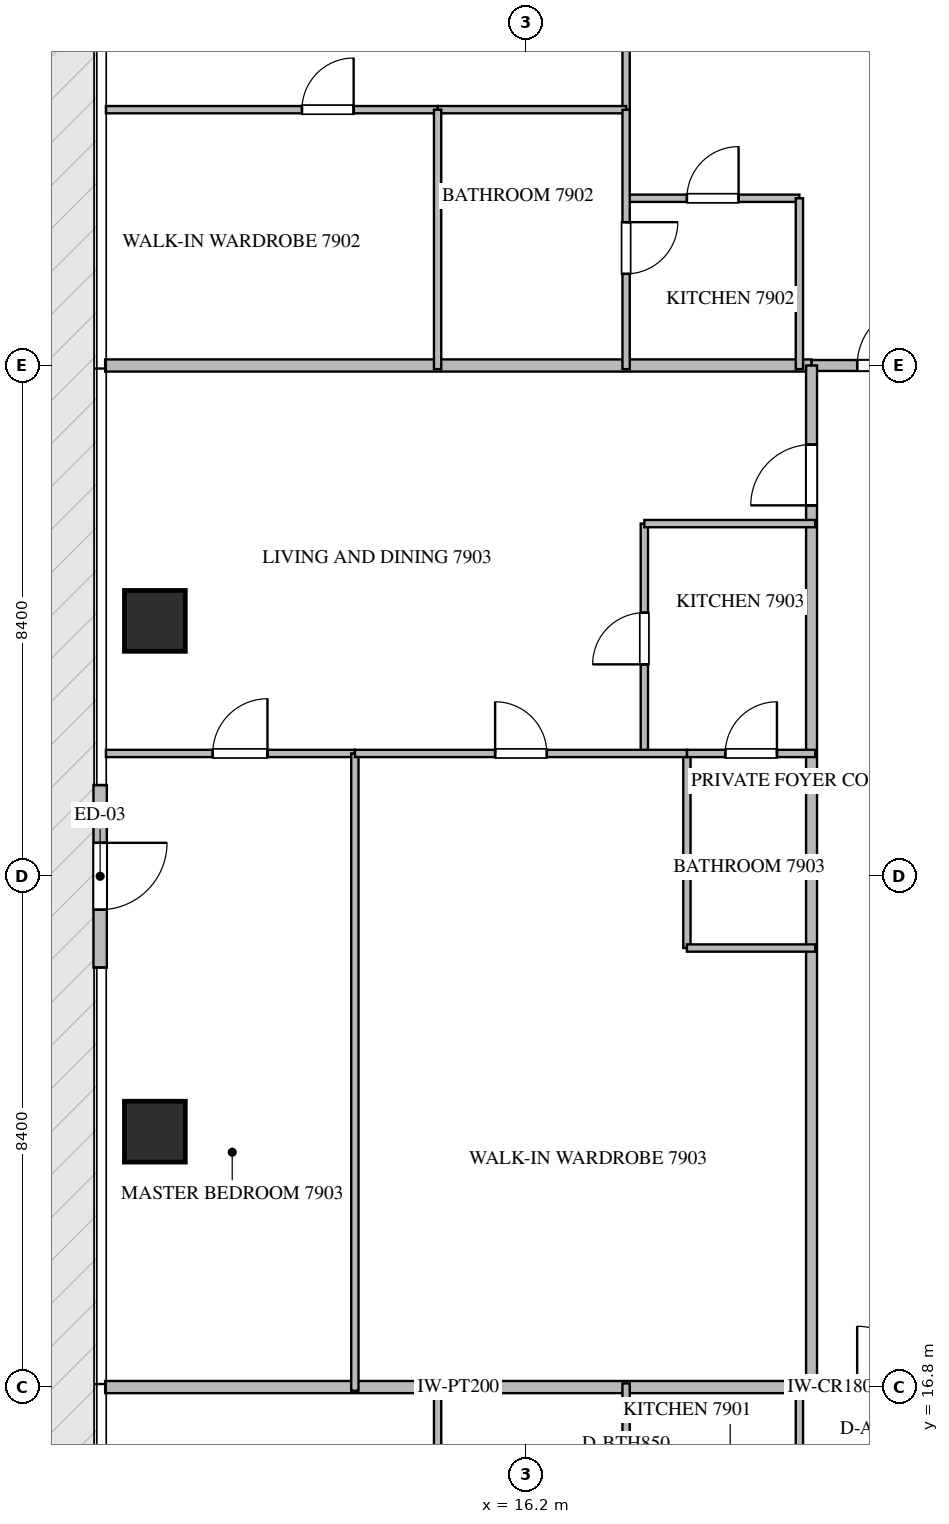
"""IFC4 building model, lengths in metres.
Left out: names, types, materials, properties, quantities, classifications, styles, units other than length and angle.
Written with IfcOpenShell. Run it as: python <this file> out.ifc"""

import sys

from ifc_helpers import new_model, si_unit, direction, frame, frame_2d, origin, origin_2d, place, context, subcontext, project, spatial, rectangle, extrude, source, transform, mapped, element, fill, save


model = new_model("IFC4")
c1 = context("Model", 3, precision=1e-05, world=origin(), true_north=direction((0.0, 1.0)))
c2 = subcontext(c1, "Body", "Model", "MODEL_VIEW")
j1 = project(units=[si_unit("LENGTHUNIT", "METRE"), si_unit("PLANEANGLEUNIT", "RADIAN")], contexts=[c1])
p1 = place(None, origin())
s1 = spatial("IfcSite", under=j1, at=p1, CompositionType="ELEMENT")
p2 = place(p1, origin())
s2 = spatial("IfcBuilding", under=s1, at=p2, CompositionType="ELEMENT")
p3 = place(p2, frame((0.0, 0.0, 317.75)))
s3 = spatial("IfcBuildingStorey", under=s2, at=p3, CompositionType="ELEMENT", Elevation=317.75)
m1 = source(origin(), c2, "Body", "SweptSolid", [
    extrude(rectangle(XDim=1.0, YDim=1.0, at=origin_2d()), origin(), (0.0, 0.0, 1.0), 4.05),
])
for number, where, z_axis, x_axis in (
    (1, (10.1, 21.0, -0.26), (0.0, 0.0, 1.0), (1.0, 0.0, 0.0)),
    (2, (10.1, 29.4, -0.26), (0.0, 0.0, 1.0), (1.0, 0.0, 0.0)),
):
    element("IfcColumn", number, at=place(p3, frame(where, z_axis=z_axis, x_axis=x_axis)), inside=s3, PredefinedType="COLUMN", context=c2, shape_type="MappedRepresentation", body=[
        mapped(m1, transform((0.0, 0.0, 0.0), scale=1.0)),
    ])
p4 = place(p3, frame((9.2, 26.7, 0.0), z_axis=(0.0, 0.0, 1.0), x_axis=(0.0, -1.0, 0.0)))
e3 = element("IfcWall", 3, at=p4, inside=s3, PredefinedType="ELEMENTEDWALL", context=c2, shape_type="SweptSolid", body=[
    extrude(rectangle(XDim=3.0, YDim=0.22, at=frame_2d((1.5, 0.0))), origin(), (0.0, 0.0, 1.0), 3.775),
])
p5 = place(p4, frame((0.95, 0.0, 0.0)))
e4 = element("IfcOpeningElement", 4, at=p5, cuts=e3, PredefinedType="OPENING", context=c2, shape_type="SweptSolid", body=[
    extrude(rectangle(XDim=1.1, YDim=2.2, at=frame_2d((0.55, 1.1))), frame((0.0, 0.12, 0.0), z_axis=(0.0, -1.0, 0.0), x_axis=(1.0, 0.0, 0.0)), (0.0, 0.0, 1.0), 0.24),
])
for number, where, z_axis, x_axis in (
    (5, (9.282, 16.8, 0.0), (0.0, 0.0, 1.0), (1.0, 0.0, 0.0)),
    (6, (9.282, 33.6, 0.0), (0.0, 0.0, 1.0), (1.0, 0.0, 0.0)),
):
    element("IfcWall", number, at=place(p3, frame(where, z_axis=z_axis, x_axis=x_axis)), inside=s3, PredefinedType="PARTITIONING", context=c2, shape_type="SweptSolid", body=[
        extrude(rectangle(XDim=11.618, YDim=0.2, at=frame_2d((5.809, 0.0))), origin(), (0.0, 0.0, 1.0), 3.79),
    ])
p6 = place(p3, frame((20.902, 16.8, 0.0), z_axis=(0.0, 0.0, 1.0), x_axis=(1.0, 0.0, 0.0)))
e7 = element("IfcWall", 7, at=p6, inside=s3, PredefinedType="PARTITIONING", context=c2, shape_type="SweptSolid", body=[
    extrude(rectangle(XDim=2.496, YDim=0.18, at=frame_2d((1.248, 0.0))), origin(), (0.0, 0.0, 1.0), 3.79),
])
p7 = place(p6, frame((0.748, 0.0, 0.0)))
e8 = element("IfcOpeningElement", 8, at=p7, cuts=e7, PredefinedType="OPENING", context=c2, shape_type="SweptSolid", body=[
    extrude(rectangle(XDim=1.0, YDim=2.15, at=frame_2d((0.5, 1.075))), frame((0.0, 0.1, 0.0), z_axis=(0.0, -1.0, 0.0), x_axis=(1.0, 0.0, 0.0)), (0.0, 0.0, 1.0), 0.2),
])
p8 = place(p3, frame((20.902, 33.6, 0.0), z_axis=(0.0, 0.0, 1.0), x_axis=(1.0, 0.0, 0.0)))
e9 = element("IfcWall", 9, at=p8, inside=s3, PredefinedType="PARTITIONING", context=c2, shape_type="SweptSolid", body=[
    extrude(rectangle(XDim=2.496, YDim=0.18, at=frame_2d((1.248, 0.0))), origin(), (0.0, 0.0, 1.0), 3.79),
])
p9 = place(p8, frame((0.748, 0.0, 0.0)))
e10 = element("IfcOpeningElement", 10, at=p9, cuts=e9, PredefinedType="OPENING", context=c2, shape_type="SweptSolid", body=[
    extrude(rectangle(XDim=1.0, YDim=2.15, at=frame_2d((0.5, 1.075))), frame((0.0, 0.1, 0.0), z_axis=(0.0, -1.0, 0.0), x_axis=(1.0, 0.0, 0.0)), (0.0, 0.0, 1.0), 0.2),
])
p10 = place(p3, frame((20.9, 16.8, 0.0), z_axis=(0.0, 0.0, 1.0), x_axis=(0.0, 1.0, 0.0)))
e11 = element("IfcWall", 11, at=p10, inside=s3, PredefinedType="PARTITIONING", context=c2, shape_type="SweptSolid", body=[
    extrude(rectangle(XDim=16.8, YDim=0.18, at=frame_2d((8.4, 0.0))), origin(), (0.0, 0.0, 1.0), 3.79),
])
p11 = place(p10, frame((14.5, 0.0, 0.0)))
e12 = element("IfcOpeningElement", 12, at=p11, cuts=e11, PredefinedType="OPENING", context=c2, shape_type="SweptSolid", body=[
    extrude(rectangle(XDim=1.0, YDim=2.15, at=frame_2d((0.5, 1.075))), frame((0.0, 0.1, 0.0), z_axis=(0.0, -1.0, 0.0), x_axis=(1.0, 0.0, 0.0)), (0.0, 0.0, 1.0), 0.2),
])
p12 = place(p3, frame((20.7, 14.05, 0.0), z_axis=(0.0, 0.0, 1.0), x_axis=(0.0, 1.0, 0.0)))
e13 = element("IfcWall", 13, at=p12, inside=s3, PredefinedType="PARTITIONING", context=c2, shape_type="SweptSolid", body=[
    extrude(rectangle(XDim=2.81, YDim=0.12, at=frame_2d((1.405, 0.0))), origin(), (0.0, 0.0, 1.0), 3.79),
])
p13 = place(p3, frame((14.75, 12.593, 0.0), z_axis=(0.0, 0.0, 1.0), x_axis=(0.0, 1.0, 0.0)))
e14 = element("IfcWall", 14, at=p13, inside=s3, PredefinedType="PARTITIONING", context=c2, shape_type="SweptSolid", body=[
    extrude(rectangle(XDim=4.267, YDim=0.12, at=frame_2d((2.134, 0.0))), origin(), (0.0, 0.0, 1.0), 3.79),
])
p14 = place(p3, frame((17.85, 12.595, 0.0), z_axis=(0.0, 0.0, 1.0), x_axis=(0.0, 1.0, 0.0)))
e15 = element("IfcWall", 15, at=p14, inside=s3, PredefinedType="PARTITIONING", context=c2, shape_type="SweptSolid", body=[
    extrude(rectangle(XDim=4.265, YDim=0.12, at=frame_2d((2.133, 0.0))), origin(), (0.0, 0.0, 1.0), 3.372),
])
p15 = place(p14, frame((1.847, 0.0, 0.0)))
e16 = element("IfcOpeningElement", 16, at=p15, cuts=e15, PredefinedType="OPENING", context=c2, shape_type="SweptSolid", body=[
    extrude(rectangle(XDim=0.85, YDim=2.1, at=frame_2d((0.425, 1.05))), frame((0.0, 0.07, 0.0), z_axis=(0.0, -1.0, 0.0), x_axis=(1.0, 0.0, 0.0)), (0.0, 0.0, 1.0), 0.14),
])
p16 = place(p3, frame((17.85, 36.35, 0.0), z_axis=(0.0, 0.0, 1.0), x_axis=(1.0, 0.0, 0.0)))
e17 = element("IfcWall", 17, at=p16, inside=s3, PredefinedType="PARTITIONING", context=c2, shape_type="SweptSolid", body=[
    extrude(rectangle(XDim=2.85, YDim=0.12, at=frame_2d((1.425, 0.0))), origin(), (0.0, 0.0, 1.0), 3.79),
])
p17 = place(p16, frame((1.0, 0.0, 0.0)))
e18 = element("IfcOpeningElement", 18, at=p17, cuts=e17, PredefinedType="OPENING", context=c2, shape_type="SweptSolid", body=[
    extrude(rectangle(XDim=0.85, YDim=2.1, at=frame_2d((0.425, 1.05))), frame((0.0, 0.07, 0.0), z_axis=(0.0, -1.0, 0.0), x_axis=(1.0, 0.0, 0.0)), (0.0, 0.0, 1.0), 0.14),
])
p18 = place(p3, frame((20.7, 36.35, 0.0), z_axis=(0.0, 0.0, 1.0), x_axis=(0.0, -1.0, 0.0)))
e19 = element("IfcWall", 19, at=p18, inside=s3, PredefinedType="PARTITIONING", context=c2, shape_type="SweptSolid", body=[
    extrude(rectangle(XDim=2.81, YDim=0.12, at=frame_2d((1.405, 0.0))), origin(), (0.0, 0.0, 1.0), 3.79),
])
p19 = place(p3, frame((17.85, 47.905, 0.0), z_axis=(0.0, 0.0, 1.0), x_axis=(0.0, -1.0, 0.0)))
e20 = element("IfcWall", 20, at=p19, inside=s3, PredefinedType="PARTITIONING", context=c2, shape_type="SweptSolid", body=[
    extrude(rectangle(XDim=10.098, YDim=0.12, at=frame_2d((5.049, 0.0))), origin(), (0.0, 0.0, 1.0), 3.292),
])
p20 = place(p19, frame((5.059, 0.0, 0.0)))
e21 = element("IfcOpeningElement", 21, at=p20, cuts=e20, PredefinedType="OPENING", context=c2, shape_type="SweptSolid", body=[
    extrude(rectangle(XDim=0.9, YDim=2.1, at=frame_2d((0.45, 1.05))), frame((0.0, 0.07, 0.0), z_axis=(0.0, -1.0, 0.0), x_axis=(1.0, 0.0, 0.0)), (0.0, 0.0, 1.0), 0.14),
])
p21 = place(p3, frame((9.295, 37.807, 0.0), z_axis=(0.0, 0.0, 1.0), x_axis=(1.0, 0.0, 0.0)))
e22 = element("IfcWall", 22, at=p21, inside=s3, PredefinedType="PARTITIONING", context=c2, shape_type="SweptSolid", body=[
    extrude(rectangle(XDim=5.455, YDim=0.12, at=frame_2d((2.728, 0.0))), origin(), (0.0, 0.0, 1.0), 3.79),
])
p22 = place(p21, frame((3.224, 0.0, 0.0)))
e23 = element("IfcOpeningElement", 23, at=p22, cuts=e22, PredefinedType="OPENING", context=c2, shape_type="SweptSolid", body=[
    extrude(rectangle(XDim=0.85, YDim=2.1, at=frame_2d((0.425, 1.05))), frame((0.0, 0.07, 0.0), z_axis=(0.0, -1.0, 0.0), x_axis=(1.0, 0.0, 0.0)), (0.0, 0.0, 1.0), 0.14),
])
p23 = place(p3, frame((14.752, 37.807, 0.0), z_axis=(0.0, 0.0, 1.0), x_axis=(1.0, 0.0, 0.0)))
e24 = element("IfcWall", 24, at=p23, inside=s3, PredefinedType="PARTITIONING", context=c2, shape_type="SweptSolid", body=[
    extrude(rectangle(XDim=3.098, YDim=0.12, at=frame_2d((1.549, 0.0))), origin(), (0.0, 0.0, 1.0), 3.79),
])
p24 = place(p3, frame((14.75, 37.807, 0.0), z_axis=(0.0, 0.0, 1.0), x_axis=(0.0, -1.0, 0.0)))
e25 = element("IfcWall", 25, at=p24, inside=s3, PredefinedType="PARTITIONING", context=c2, shape_type="SweptSolid", body=[
    extrude(rectangle(XDim=4.267, YDim=0.12, at=frame_2d((2.133, 0.0))), origin(), (0.0, 0.0, 1.0), 3.79),
])
p25 = place(p3, frame((17.85, 37.805, 0.0), z_axis=(0.0, 0.0, 1.0), x_axis=(0.0, -1.0, 0.0)))
e26 = element("IfcWall", 26, at=p25, inside=s3, PredefinedType="PARTITIONING", context=c2, shape_type="SweptSolid", body=[
    extrude(rectangle(XDim=4.265, YDim=0.12, at=frame_2d((2.132, 0.0))), origin(), (0.0, 0.0, 1.0), 3.372),
])
p26 = place(p25, frame((1.848, 0.0, 0.0)))
e27 = element("IfcOpeningElement", 27, at=p26, cuts=e26, PredefinedType="OPENING", context=c2, shape_type="SweptSolid", body=[
    extrude(rectangle(XDim=0.85, YDim=2.1, at=frame_2d((0.425, 1.05))), frame((0.0, 0.07, 0.0), z_axis=(0.0, -1.0, 0.0), x_axis=(1.0, 0.0, 0.0)), (0.0, 0.0, 1.0), 0.14),
])
p27 = place(p3, frame((18.15, 27.22, 0.0), z_axis=(0.0, 0.0, 1.0), x_axis=(0.0, 1.0, 0.0)))
e28 = element("IfcWall", 28, at=p27, inside=s3, PredefinedType="PARTITIONING", context=c2, shape_type="SweptSolid", body=[
    extrude(rectangle(XDim=3.78, YDim=0.12, at=frame_2d((1.89, 0.0))), origin(), (0.0, 0.0, 1.0), 3.79),
])
p28 = place(p27, frame((1.465, 0.0, 0.0)))
e29 = element("IfcOpeningElement", 29, at=p28, cuts=e28, PredefinedType="OPENING", context=c2, shape_type="SweptSolid", body=[
    extrude(rectangle(XDim=0.85, YDim=2.1, at=frame_2d((0.425, 1.05))), frame((0.0, 0.07, 0.0), z_axis=(0.0, -1.0, 0.0), x_axis=(1.0, 0.0, 0.0)), (0.0, 0.0, 1.0), 0.14),
])
p29 = place(p3, frame((18.15, 31.0, 0.0), z_axis=(0.0, 0.0, 1.0), x_axis=(1.0, 0.0, 0.0)))
e30 = element("IfcWall", 30, at=p29, inside=s3, PredefinedType="PARTITIONING", context=c2, shape_type="SweptSolid", body=[
    extrude(rectangle(XDim=2.81, YDim=0.12, at=frame_2d((1.405, 0.0))), origin(), (0.0, 0.0, 1.0), 3.79),
])
p30 = place(p3, frame((9.295, 27.22, 0.0), z_axis=(0.0, 0.0, 1.0), x_axis=(1.0, 0.0, 0.0)))
e31 = element("IfcWall", 31, at=p30, inside=s3, PredefinedType="PARTITIONING", context=c2, shape_type="SweptSolid", body=[
    extrude(rectangle(XDim=4.094, YDim=0.12, at=frame_2d((2.047, 0.0))), origin(), (0.0, 0.0, 1.0), 3.79),
])
p31 = place(p30, frame((1.757, 0.0, 0.0)))
e32 = element("IfcOpeningElement", 32, at=p31, cuts=e31, PredefinedType="OPENING", context=c2, shape_type="SweptSolid", body=[
    extrude(rectangle(XDim=0.9, YDim=2.1, at=frame_2d((0.45, 1.05))), frame((0.0, 0.07, 0.0), z_axis=(0.0, -1.0, 0.0), x_axis=(1.0, 0.0, 0.0)), (0.0, 0.0, 1.0), 0.14),
])
p32 = place(p3, frame((13.389, 16.74, 0.0), z_axis=(0.0, 0.0, 1.0), x_axis=(0.0, 1.0, 0.0)))
e33 = element("IfcWall", 33, at=p32, inside=s3, PredefinedType="PARTITIONING", context=c2, shape_type="SweptSolid", body=[
    extrude(rectangle(XDim=10.48, YDim=0.12, at=frame_2d((5.24, 0.0))), origin(), (0.0, 0.0, 1.0), 3.79),
])
p33 = place(p3, frame((18.85, 24.02, 0.0), z_axis=(0.0, 0.0, 1.0), x_axis=(0.0, 1.0, 0.0)))
e34 = element("IfcWall", 34, at=p33, inside=s3, PredefinedType="PARTITIONING", context=c2, shape_type="SweptSolid", body=[
    extrude(rectangle(XDim=3.2, YDim=0.12, at=frame_2d((1.6, 0.0))), origin(), (0.0, 0.0, 1.0), 3.79),
])
p34 = place(p3, frame((18.85, 24.02, 0.0), z_axis=(0.0, 0.0, 1.0), x_axis=(1.0, 0.0, 0.0)))
e35 = element("IfcWall", 35, at=p34, inside=s3, PredefinedType="PARTITIONING", context=c2, shape_type="SweptSolid", body=[
    extrude(rectangle(XDim=2.11, YDim=0.12, at=frame_2d((1.055, 0.0))), origin(), (0.0, 0.0, 1.0), 3.79),
])
p35 = place(p3, frame((13.391, 27.22, 0.0), z_axis=(0.0, 0.0, 1.0), x_axis=(1.0, 0.0, 0.0)))
e36 = element("IfcWall", 36, at=p35, inside=s3, PredefinedType="PARTITIONING", context=c2, shape_type="SweptSolid", body=[
    extrude(rectangle(XDim=5.459, YDim=0.12, at=frame_2d((2.729, 0.0))), origin(), (0.0, 0.0, 1.0), 3.79),
])
p36 = place(p35, frame((2.305, 0.0, 0.0)))
e37 = element("IfcOpeningElement", 37, at=p36, cuts=e36, PredefinedType="OPENING", context=c2, shape_type="SweptSolid", body=[
    extrude(rectangle(XDim=0.85, YDim=2.1, at=frame_2d((0.425, 1.05))), frame((0.0, 0.07, 0.0), z_axis=(0.0, -1.0, 0.0), x_axis=(1.0, 0.0, 0.0)), (0.0, 0.0, 1.0), 0.14),
])
p37 = place(p3, frame((18.852, 27.22, 0.0), z_axis=(0.0, 0.0, 1.0), x_axis=(1.0, 0.0, 0.0)))
e38 = element("IfcWall", 38, at=p37, inside=s3, PredefinedType="PARTITIONING", context=c2, shape_type="SweptSolid", body=[
    extrude(rectangle(XDim=2.108, YDim=0.12, at=frame_2d((1.054, 0.0))), origin(), (0.0, 0.0, 1.0), 3.79),
])
p38 = place(p37, frame((0.629, 0.0, 0.0)))
e39 = element("IfcOpeningElement", 39, at=p38, cuts=e38, PredefinedType="OPENING", context=c2, shape_type="SweptSolid", body=[
    extrude(rectangle(XDim=0.85, YDim=2.1, at=frame_2d((0.425, 1.05))), frame((0.0, 0.07, 0.0), z_axis=(0.0, -1.0, 0.0), x_axis=(1.0, 0.0, 0.0)), (0.0, 0.0, 1.0), 0.14),
])
m2 = source(origin(), c2, "Body", "SweptSolid", [
    extrude(rectangle(XDim=1.1, YDim=2.2, at=frame_2d((0.55, 1.1))), frame((0.0, 0.025, 0.0), z_axis=(0.0, -1.0, 0.0), x_axis=(1.0, 0.0, 0.0)), (0.0, 0.0, 1.0), 0.05),
])
p39 = place(p5, origin())
e40 = element("IfcDoor", 40, at=p39, inside=s3, OperationType="SINGLE_SWING_LEFT", PredefinedType="DOOR", context=c2, shape_type="MappedRepresentation", body=[
    mapped(m2, transform((0.0, 0.0, 0.0), scale=1.0)),
])
fill(e4, e40)
m3 = source(origin(), c2, "Body", "SweptSolid", [
    extrude(rectangle(XDim=1.0, YDim=2.15, at=frame_2d((0.5, 1.075))), frame((0.0, 0.025, 0.0), z_axis=(0.0, -1.0, 0.0), x_axis=(1.0, 0.0, 0.0)), (0.0, 0.0, 1.0), 0.05),
])
p40 = place(p7, origin())
e41 = element("IfcDoor", 41, at=p40, inside=s3, OperationType="SINGLE_SWING_LEFT", PredefinedType="DOOR", context=c2, shape_type="MappedRepresentation", body=[
    mapped(m3, transform((0.0, 0.0, 0.0), scale=1.0)),
])
fill(e8, e41)
p41 = place(p9, origin())
e42 = element("IfcDoor", 42, at=p41, inside=s3, OperationType="SINGLE_SWING_RIGHT", PredefinedType="DOOR", context=c2, shape_type="MappedRepresentation", body=[
    mapped(m3, transform((0.0, 0.0, 0.0), scale=1.0)),
])
fill(e10, e42)
p42 = place(p11, origin())
e43 = element("IfcDoor", 43, at=p42, inside=s3, OperationType="SINGLE_SWING_LEFT", PredefinedType="DOOR", context=c2, shape_type="MappedRepresentation", body=[
    mapped(m3, transform((0.0, 0.0, 0.0), scale=1.0)),
])
fill(e12, e43)
m4 = source(origin(), c2, "Body", "SweptSolid", [
    extrude(rectangle(XDim=0.85, YDim=2.1, at=frame_2d((0.425, 1.05))), frame((0.0, 0.025, 0.0), z_axis=(0.0, -1.0, 0.0), x_axis=(1.0, 0.0, 0.0)), (0.0, 0.0, 1.0), 0.05),
])
p43 = place(p17, origin())
e44 = element("IfcDoor", 44, at=p43, inside=s3, OperationType="SINGLE_SWING_RIGHT", PredefinedType="DOOR", context=c2, shape_type="MappedRepresentation", body=[
    mapped(m4, transform((0.0, 0.0, 0.0), scale=1.0)),
])
fill(e18, e44)
p44 = place(p22, origin())
e45 = element("IfcDoor", 45, at=p44, inside=s3, OperationType="SINGLE_SWING_RIGHT", PredefinedType="DOOR", context=c2, shape_type="MappedRepresentation", body=[
    mapped(m4, transform((0.0, 0.0, 0.0), scale=1.0)),
])
fill(e23, e45)
p45 = place(p26, origin())
e46 = element("IfcDoor", 46, at=p45, inside=s3, OperationType="SINGLE_SWING_LEFT", PredefinedType="DOOR", context=c2, shape_type="MappedRepresentation", body=[
    mapped(m4, transform((0.0, 0.0, 0.0), scale=1.0)),
])
fill(e27, e46)
p46 = place(p28, origin())
e47 = element("IfcDoor", 47, at=p46, inside=s3, OperationType="SINGLE_SWING_LEFT", PredefinedType="DOOR", context=c2, shape_type="MappedRepresentation", body=[
    mapped(m4, transform((0.0, 0.0, 0.0), scale=1.0)),
])
fill(e29, e47)
m5 = source(origin(), c2, "Body", "SweptSolid", [
    extrude(rectangle(XDim=0.9, YDim=2.1, at=frame_2d((0.45, 1.05))), frame((0.0, 0.025, 0.0), z_axis=(0.0, -1.0, 0.0), x_axis=(1.0, 0.0, 0.0)), (0.0, 0.0, 1.0), 0.05),
])
p47 = place(p31, origin())
e48 = element("IfcDoor", 48, at=p47, inside=s3, OperationType="SINGLE_SWING_RIGHT", PredefinedType="DOOR", context=c2, shape_type="MappedRepresentation", body=[
    mapped(m5, transform((0.0, 0.0, 0.0), scale=1.0)),
])
fill(e32, e48)
p48 = place(p36, origin())
e49 = element("IfcDoor", 49, at=p48, inside=s3, OperationType="SINGLE_SWING_LEFT", PredefinedType="DOOR", context=c2, shape_type="MappedRepresentation", body=[
    mapped(m4, transform((0.0, 0.0, 0.0), scale=1.0)),
])
fill(e37, e49)
p49 = place(p38, origin())
e50 = element("IfcDoor", 50, at=p49, inside=s3, OperationType="SINGLE_SWING_RIGHT", PredefinedType="DOOR", context=c2, shape_type="MappedRepresentation", body=[
    mapped(m4, transform((0.0, 0.0, 0.0), scale=1.0)),
])
fill(e39, e50)
save(model, sys.argv[1])
